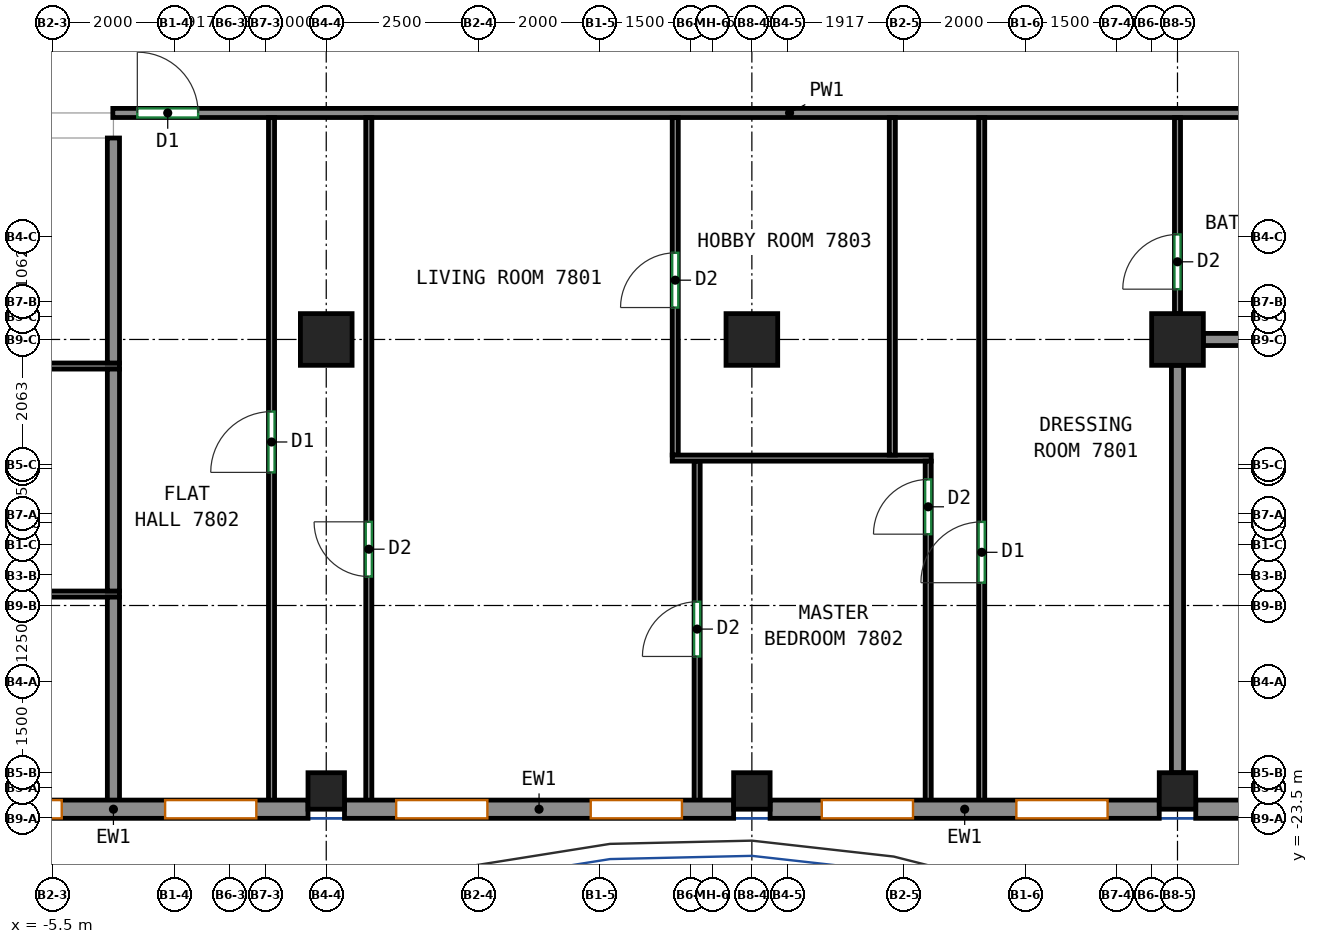
"""IFC4 building model, lengths in metres.
Left out: names, types, materials, properties, quantities, classifications, styles, units other than length and angle.
Written with IfcOpenShell. Run it as: python <this file> out.ifc"""

import sys

from ifc_helpers import new_model, si_unit, direction, frame, frame_2d, origin, origin_2d, place, context, subcontext, project, spatial, rectangle, extrude, source, transform, mapped, element, fill, save


model = new_model("IFC4")
c1 = context("Model", 3, precision=1e-05, world=origin(), true_north=direction((0.0, 1.0)))
c2 = subcontext(c1, "Body", "Model", "MODEL_VIEW")
j1 = project(units=[si_unit("LENGTHUNIT", "METRE"), si_unit("PLANEANGLEUNIT", "RADIAN")], contexts=[c1])
p1 = place(None, origin())
s1 = spatial("IfcSite", under=j1, at=p1, CompositionType="ELEMENT")
p2 = place(p1, origin())
s2 = spatial("IfcBuilding", under=s1, at=p2, CompositionType="ELEMENT")
p3 = place(p2, frame((0.0, 0.0, 312.0)))
s3 = spatial("IfcBuildingStorey", under=s2, at=p3, CompositionType="ELEMENT", Elevation=312.0)
m1 = source(origin(), c2, "Body", "SweptSolid", [
    extrude(rectangle(XDim=0.6, YDim=0.6, at=origin_2d()), origin(), (0.0, 0.0, 1.0), 3.12),
])
p4 = place(p3, frame((-1.0, -23.05, 0.0), z_axis=(0.0, 0.0, 1.0), x_axis=(1.0, 0.0, 0.0)))
e1 = element("IfcColumn", 1, at=p4, inside=s3, PredefinedType="COLUMN", context=c2, shape_type="MappedRepresentation", body=[
    mapped(m1, transform((0.0, 0.0, 0.0))),
])
m2 = source(origin(), c2, "Body", "SweptSolid", [
    extrude(rectangle(XDim=0.85, YDim=0.85, at=origin_2d()), origin(), (0.0, 0.0, 1.0), 3.12),
])
p5 = place(p3, frame((-1.0, -15.625, 0.0), z_axis=(0.0, 0.0, 1.0), x_axis=(1.0, 0.0, 0.0)))
e2 = element("IfcColumn", 2, at=p5, inside=s3, PredefinedType="COLUMN", context=c2, shape_type="MappedRepresentation", body=[
    mapped(m2, transform((0.0, 0.0, 0.0))),
])
p6 = place(p3, frame((6.0, -23.05, 0.0), z_axis=(0.0, 0.0, 1.0), x_axis=(1.0, 0.0, 0.0)))
e3 = element("IfcColumn", 3, at=p6, inside=s3, PredefinedType="COLUMN", context=c2, shape_type="MappedRepresentation", body=[
    mapped(m1, transform((0.0, 0.0, 0.0))),
])
p7 = place(p3, frame((6.0, -15.625, 0.0), z_axis=(0.0, 0.0, 1.0), x_axis=(1.0, 0.0, 0.0)))
e4 = element("IfcColumn", 4, at=p7, inside=s3, PredefinedType="COLUMN", context=c2, shape_type="MappedRepresentation", body=[
    mapped(m2, transform((0.0, 0.0, 0.0))),
])
p8 = place(p3, frame((13.0, -23.05, 0.0), z_axis=(0.0, 0.0, 1.0), x_axis=(1.0, 0.0, 0.0)))
e5 = element("IfcColumn", 5, at=p8, inside=s3, PredefinedType="COLUMN", context=c2, shape_type="MappedRepresentation", body=[
    mapped(m1, transform((0.0, 0.0, 0.0))),
])
p9 = place(p3, frame((13.0, -15.625, 0.0), z_axis=(0.0, 0.0, 1.0), x_axis=(1.0, 0.0, 0.0)))
e6 = element("IfcColumn", 6, at=p9, inside=s3, PredefinedType="COLUMN", context=c2, shape_type="MappedRepresentation", body=[
    mapped(m2, transform((0.0, 0.0, 0.0))),
])
m3 = source(origin(), c2, "Body", "SweptSolid", [
    extrude(rectangle(XDim=6.4, YDim=0.3, at=frame_2d((3.2, 0.0))), origin(), (0.0, 0.0, 1.0), 3.12),
])
p10 = place(p3, frame((-7.7, -23.35, 0.0), z_axis=(0.0, 0.0, 1.0), x_axis=(1.0, 0.0, 0.0)))
e7 = element("IfcWall", 7, at=p10, inside=s3, PredefinedType="SOLIDWALL", context=c2, shape_type="MappedRepresentation", body=[
    mapped(m3, transform((0.0, 0.0, 0.0))),
])
p11 = place(p10, frame((0.85, 0.0, 0.8)))
e8 = element("IfcOpeningElement", 8, at=p11, cuts=e7, PredefinedType="OPENING", context=c2, shape_type="SweptSolid", body=[
    extrude(rectangle(XDim=1.5, YDim=2.05, at=frame_2d((0.75, 1.025))), frame((0.0, 0.16, 0.0), z_axis=(0.0, -1.0, 0.0), x_axis=(1.0, 0.0, 0.0)), (0.0, 0.0, 1.0), 0.32),
])
p12 = place(p10, frame((4.05, 0.0, 0.8)))
e9 = element("IfcOpeningElement", 9, at=p12, cuts=e7, PredefinedType="OPENING", context=c2, shape_type="SweptSolid", body=[
    extrude(rectangle(XDim=1.5, YDim=2.05, at=frame_2d((0.75, 1.025))), frame((0.0, 0.16, 0.0), z_axis=(0.0, -1.0, 0.0), x_axis=(1.0, 0.0, 0.0)), (0.0, 0.0, 1.0), 0.32),
])
p13 = place(p3, frame((-0.7, -23.35, 0.0), z_axis=(0.0, 0.0, 1.0), x_axis=(1.0, 0.0, 0.0)))
e10 = element("IfcWall", 10, at=p13, inside=s3, PredefinedType="SOLIDWALL", context=c2, shape_type="MappedRepresentation", body=[
    mapped(m3, transform((0.0, 0.0, 0.0))),
])
p14 = place(p13, frame((0.85, 0.0, 0.8)))
e11 = element("IfcOpeningElement", 11, at=p14, cuts=e10, PredefinedType="OPENING", context=c2, shape_type="SweptSolid", body=[
    extrude(rectangle(XDim=1.5, YDim=2.05, at=frame_2d((0.75, 1.025))), frame((0.0, 0.16, 0.0), z_axis=(0.0, -1.0, 0.0), x_axis=(1.0, 0.0, 0.0)), (0.0, 0.0, 1.0), 0.32),
])
p15 = place(p13, frame((4.05, 0.0, 0.8)))
e12 = element("IfcOpeningElement", 12, at=p15, cuts=e10, PredefinedType="OPENING", context=c2, shape_type="SweptSolid", body=[
    extrude(rectangle(XDim=1.5, YDim=2.05, at=frame_2d((0.75, 1.025))), frame((0.0, 0.16, 0.0), z_axis=(0.0, -1.0, 0.0), x_axis=(1.0, 0.0, 0.0)), (0.0, 0.0, 1.0), 0.32),
])
p16 = place(p3, frame((6.3, -23.35, 0.0), z_axis=(0.0, 0.0, 1.0), x_axis=(1.0, 0.0, 0.0)))
e13 = element("IfcWall", 13, at=p16, inside=s3, PredefinedType="SOLIDWALL", context=c2, shape_type="MappedRepresentation", body=[
    mapped(m3, transform((0.0, 0.0, 0.0))),
])
p17 = place(p16, frame((0.85, 0.0, 0.8)))
e14 = element("IfcOpeningElement", 14, at=p17, cuts=e13, PredefinedType="OPENING", context=c2, shape_type="SweptSolid", body=[
    extrude(rectangle(XDim=1.5, YDim=2.05, at=frame_2d((0.75, 1.025))), frame((0.0, 0.16, 0.0), z_axis=(0.0, -1.0, 0.0), x_axis=(1.0, 0.0, 0.0)), (0.0, 0.0, 1.0), 0.32),
])
p18 = place(p16, frame((4.05, 0.0, 0.8)))
e15 = element("IfcOpeningElement", 15, at=p18, cuts=e13, PredefinedType="OPENING", context=c2, shape_type="SweptSolid", body=[
    extrude(rectangle(XDim=1.5, YDim=2.05, at=frame_2d((0.75, 1.025))), frame((0.0, 0.16, 0.0), z_axis=(0.0, -1.0, 0.0), x_axis=(1.0, 0.0, 0.0)), (0.0, 0.0, 1.0), 0.32),
])
p19 = place(p3, frame((13.3, -23.35, 0.0), z_axis=(0.0, 0.0, 1.0), x_axis=(1.0, 0.0, 0.0)))
e16 = element("IfcWall", 16, at=p19, inside=s3, PredefinedType="SOLIDWALL", context=c2, shape_type="MappedRepresentation", body=[
    mapped(m3, transform((0.0, 0.0, 0.0))),
])
p20 = place(p19, frame((0.85, 0.0, 0.8)))
e17 = element("IfcOpeningElement", 17, at=p20, cuts=e16, PredefinedType="OPENING", context=c2, shape_type="SweptSolid", body=[
    extrude(rectangle(XDim=1.5, YDim=2.05, at=frame_2d((0.75, 1.025))), frame((0.0, 0.16, 0.0), z_axis=(0.0, -1.0, 0.0), x_axis=(1.0, 0.0, 0.0)), (0.0, 0.0, 1.0), 0.32),
])
p21 = place(p19, frame((4.05, 0.0, 0.8)))
e18 = element("IfcOpeningElement", 18, at=p21, cuts=e16, PredefinedType="OPENING", context=c2, shape_type="SweptSolid", body=[
    extrude(rectangle(XDim=1.5, YDim=2.05, at=frame_2d((0.75, 1.025))), frame((0.0, 0.16, 0.0), z_axis=(0.0, -1.0, 0.0), x_axis=(1.0, 0.0, 0.0)), (0.0, 0.0, 1.0), 0.32),
])
p22 = place(p3, frame((-4.51, -11.9, 0.0), z_axis=(0.0, 0.0, 1.0), x_axis=(1.0, 0.0, 0.0)))
e19 = element("IfcWall", 19, at=p22, inside=s3, PredefinedType="PARTITIONING", context=c2, shape_type="SweptSolid", body=[
    extrude(rectangle(XDim=22.26, YDim=0.15, at=frame_2d((11.13, 0.0))), origin(), (0.0, 0.0, 1.0), 3.12),
])
p23 = place(p22, frame((0.403, 0.0, 0.0)))
e20 = element("IfcOpeningElement", 20, at=p23, cuts=e19, PredefinedType="OPENING", context=c2, shape_type="SweptSolid", body=[
    extrude(rectangle(XDim=1.0, YDim=2.1, at=frame_2d((0.5, 1.05))), frame((0.0, 0.085, 0.0), z_axis=(0.0, -1.0, 0.0), x_axis=(1.0, 0.0, 0.0)), (0.0, 0.0, 1.0), 0.17),
])
p24 = place(p3, frame((-24.75, -19.812, 0.0), z_axis=(0.0, 0.0, 1.0), x_axis=(1.0, 0.0, 0.0)))
e21 = element("IfcWall", 21, at=p24, inside=s3, PredefinedType="PARTITIONING", context=c2, shape_type="SweptSolid", body=[
    extrude(rectangle(XDim=20.35, YDim=0.1, at=frame_2d((10.175, 0.0))), origin(), (0.0, 0.0, 1.0), 3.12),
])
p25 = place(p24, frame((2.624, 0.0, 0.0)))
e22 = element("IfcOpeningElement", 22, at=p25, cuts=e21, PredefinedType="OPENING", context=c2, shape_type="SweptSolid", body=[
    extrude(rectangle(XDim=0.9, YDim=2.1, at=frame_2d((0.45, 1.05))), frame((0.0, 0.06, 0.0), z_axis=(0.0, -1.0, 0.0), x_axis=(1.0, 0.0, 0.0)), (0.0, 0.0, 1.0), 0.12),
])
p26 = place(p3, frame((-4.5, -23.25, 0.0), z_axis=(0.0, 0.0, 1.0), x_axis=(0.0, 1.0, 0.0)))
e23 = element("IfcWall", 23, at=p26, inside=s3, PredefinedType="PARTITIONING", context=c2, shape_type="SweptSolid", body=[
    extrude(rectangle(XDim=3.388, YDim=0.2, at=frame_2d((1.694, 0.0))), origin(), (0.0, 0.0, 1.0), 3.12),
])
p27 = place(p3, frame((-7.575, -16.062, 0.0), z_axis=(0.0, 0.0, 1.0), x_axis=(1.0, 0.0, 0.0)))
e24 = element("IfcWall", 24, at=p27, inside=s3, PredefinedType="PARTITIONING", context=c2, shape_type="SweptSolid", body=[
    extrude(rectangle(XDim=3.175, YDim=0.1, at=frame_2d((1.587, 0.0))), origin(), (0.0, 0.0, 1.0), 3.12),
])
p28 = place(p3, frame((-4.5, -19.762, 0.0), z_axis=(0.0, 0.0, 1.0), x_axis=(0.0, 1.0, 0.0)))
e25 = element("IfcWall", 25, at=p28, inside=s3, PredefinedType="PARTITIONING", context=c2, shape_type="SweptSolid", body=[
    extrude(rectangle(XDim=3.65, YDim=0.2, at=frame_2d((1.825, 0.0))), origin(), (0.0, 0.0, 1.0), 3.12),
])
p29 = place(p3, frame((-4.5, -16.012, 0.0), z_axis=(0.0, 0.0, 1.0), x_axis=(0.0, 1.0, 0.0)))
e26 = element("IfcWall", 26, at=p29, inside=s3, PredefinedType="PARTITIONING", context=c2, shape_type="SweptSolid", body=[
    extrude(rectangle(XDim=3.7, YDim=0.2, at=frame_2d((1.85, 0.0))), origin(), (0.0, 0.0, 1.0), 3.12),
])
p30 = place(p3, frame((-1.9, -23.25, 0.0), z_axis=(0.0, 0.0, 1.0), x_axis=(0.0, 1.0, 0.0)))
e27 = element("IfcWall", 27, at=p30, inside=s3, PredefinedType="PARTITIONING", context=c2, shape_type="SweptSolid", body=[
    extrude(rectangle(XDim=11.273, YDim=0.1, at=frame_2d((5.636, 0.0))), origin(), (0.0, 0.0, 1.0), 3.12),
])
p31 = place(p30, frame((5.439, 0.0, 0.0)))
e28 = element("IfcOpeningElement", 28, at=p31, cuts=e27, PredefinedType="OPENING", context=c2, shape_type="SweptSolid", body=[
    extrude(rectangle(XDim=1.0, YDim=2.1, at=frame_2d((0.5, 1.05))), frame((0.0, 0.06, 0.0), z_axis=(0.0, -1.0, 0.0), x_axis=(1.0, 0.0, 0.0)), (0.0, 0.0, 1.0), 0.12),
])
p32 = place(p3, frame((-0.3, -23.25, 0.0), z_axis=(0.0, 0.0, 1.0), x_axis=(0.0, 1.0, 0.0)))
e29 = element("IfcWall", 29, at=p32, inside=s3, PredefinedType="PARTITIONING", context=c2, shape_type="SweptSolid", body=[
    extrude(rectangle(XDim=11.273, YDim=0.1, at=frame_2d((5.636, 0.0))), origin(), (0.0, 0.0, 1.0), 3.12),
])
p33 = place(p32, frame((3.726, 0.0, 0.0)))
e30 = element("IfcOpeningElement", 30, at=p33, cuts=e29, PredefinedType="OPENING", context=c2, shape_type="SweptSolid", body=[
    extrude(rectangle(XDim=0.9, YDim=2.1, at=frame_2d((0.45, 1.05))), frame((0.0, 0.06, 0.0), z_axis=(0.0, -1.0, 0.0), x_axis=(1.0, 0.0, 0.0)), (0.0, 0.0, 1.0), 0.12),
])
p34 = place(p3, frame((5.1, -23.25, 0.0), z_axis=(0.0, 0.0, 1.0), x_axis=(0.0, 1.0, 0.0)))
e31 = element("IfcWall", 31, at=p34, inside=s3, PredefinedType="PARTITIONING", context=c2, shape_type="SweptSolid", body=[
    extrude(rectangle(XDim=5.624, YDim=0.1, at=frame_2d((2.812, 0.0))), origin(), (0.0, 0.0, 1.0), 3.12),
])
p35 = place(p34, frame((2.412, 0.0, 0.0)))
e32 = element("IfcOpeningElement", 32, at=p35, cuts=e31, PredefinedType="OPENING", context=c2, shape_type="SweptSolid", body=[
    extrude(rectangle(XDim=0.9, YDim=2.1, at=frame_2d((0.45, 1.05))), frame((0.0, 0.06, 0.0), z_axis=(0.0, -1.0, 0.0), x_axis=(1.0, 0.0, 0.0)), (0.0, 0.0, 1.0), 0.12),
])
p36 = place(p3, frame((4.74, -17.526, 0.0), z_axis=(0.0, 0.0, 1.0), x_axis=(0.0, 1.0, 0.0)))
e33 = element("IfcWall", 33, at=p36, inside=s3, PredefinedType="PARTITIONING", context=c2, shape_type="SweptSolid", body=[
    extrude(rectangle(XDim=5.549, YDim=0.1, at=frame_2d((2.774, 0.0))), origin(), (0.0, 0.0, 1.0), 3.12),
])
p37 = place(p36, frame((2.426, 0.0, 0.0)))
e34 = element("IfcOpeningElement", 34, at=p37, cuts=e33, PredefinedType="OPENING", context=c2, shape_type="SweptSolid", body=[
    extrude(rectangle(XDim=0.9, YDim=2.1, at=frame_2d((0.45, 1.05))), frame((0.0, 0.06, 0.0), z_axis=(0.0, -1.0, 0.0), x_axis=(1.0, 0.0, 0.0)), (0.0, 0.0, 1.0), 0.12),
])
p38 = place(p3, frame((4.69, -17.576, 0.0), z_axis=(0.0, 0.0, 1.0), x_axis=(1.0, 0.0, 0.0)))
e35 = element("IfcWall", 35, at=p38, inside=s3, PredefinedType="PARTITIONING", context=c2, shape_type="SweptSolid", body=[
    extrude(rectangle(XDim=4.26, YDim=0.1, at=frame_2d((2.13, 0.0))), origin(), (0.0, 0.0, 1.0), 3.12),
])
p39 = place(p3, frame((8.9, -23.25, 0.0), z_axis=(0.0, 0.0, 1.0), x_axis=(0.0, 1.0, 0.0)))
e36 = element("IfcWall", 36, at=p39, inside=s3, PredefinedType="PARTITIONING", context=c2, shape_type="SweptSolid", body=[
    extrude(rectangle(XDim=5.624, YDim=0.1, at=frame_2d((2.812, 0.0))), origin(), (0.0, 0.0, 1.0), 3.12),
])
p40 = place(p39, frame((4.423, 0.0, 0.0)))
e37 = element("IfcOpeningElement", 37, at=p40, cuts=e36, PredefinedType="OPENING", context=c2, shape_type="SweptSolid", body=[
    extrude(rectangle(XDim=0.9, YDim=2.1, at=frame_2d((0.45, 1.05))), frame((0.0, 0.06, 0.0), z_axis=(0.0, -1.0, 0.0), x_axis=(1.0, 0.0, 0.0)), (0.0, 0.0, 1.0), 0.12),
])
p41 = place(p3, frame((8.31, -17.526, 0.0), z_axis=(0.0, 0.0, 1.0), x_axis=(0.0, 1.0, 0.0)))
e38 = element("IfcWall", 38, at=p41, inside=s3, PredefinedType="PARTITIONING", context=c2, shape_type="SweptSolid", body=[
    extrude(rectangle(XDim=5.549, YDim=0.1, at=frame_2d((2.774, 0.0))), origin(), (0.0, 0.0, 1.0), 3.12),
])
p42 = place(p3, frame((9.78, -23.25, 0.0), z_axis=(0.0, 0.0, 1.0), x_axis=(0.0, 1.0, 0.0)))
e39 = element("IfcWall", 39, at=p42, inside=s3, PredefinedType="PARTITIONING", context=c2, shape_type="SweptSolid", body=[
    extrude(rectangle(XDim=11.273, YDim=0.1, at=frame_2d((5.636, 0.0))), origin(), (0.0, 0.0, 1.0), 3.12),
])
p43 = place(p42, frame((3.625, 0.0, 0.0)))
e40 = element("IfcOpeningElement", 40, at=p43, cuts=e39, PredefinedType="OPENING", context=c2, shape_type="SweptSolid", body=[
    extrude(rectangle(XDim=1.0, YDim=2.1, at=frame_2d((0.5, 1.05))), frame((0.0, 0.06, 0.0), z_axis=(0.0, -1.0, 0.0), x_axis=(1.0, 0.0, 0.0)), (0.0, 0.0, 1.0), 0.12),
])
p44 = place(p3, frame((13.0, -15.2, 0.0), z_axis=(0.0, 0.0, 1.0), x_axis=(0.0, 1.0, 0.0)))
e41 = element("IfcWall", 41, at=p44, inside=s3, PredefinedType="PARTITIONING", context=c2, shape_type="SweptSolid", body=[
    extrude(rectangle(XDim=3.223, YDim=0.1, at=frame_2d((1.611, 0.0))), origin(), (0.0, 0.0, 1.0), 3.12),
])
p45 = place(p44, frame((0.402, 0.0, 0.0)))
e42 = element("IfcOpeningElement", 42, at=p45, cuts=e41, PredefinedType="OPENING", context=c2, shape_type="SweptSolid", body=[
    extrude(rectangle(XDim=0.9, YDim=2.1, at=frame_2d((0.45, 1.05))), frame((0.0, 0.06, 0.0), z_axis=(0.0, -1.0, 0.0), x_axis=(1.0, 0.0, 0.0)), (0.0, 0.0, 1.0), 0.12),
])
p46 = place(p3, frame((13.0, -22.75, 0.0), z_axis=(0.0, 0.0, 1.0), x_axis=(0.0, 1.0, 0.0)))
e43 = element("IfcWall", 43, at=p46, inside=s3, PredefinedType="PARTITIONING", context=c2, shape_type="SweptSolid", body=[
    extrude(rectangle(XDim=6.7, YDim=0.2, at=frame_2d((3.35, 0.0))), origin(), (0.0, 0.0, 1.0), 3.12),
])
p47 = place(p3, frame((13.425, -15.625, 0.0), z_axis=(0.0, 0.0, 1.0), x_axis=(1.0, 0.0, 0.0)))
e44 = element("IfcWall", 44, at=p47, inside=s3, PredefinedType="PARTITIONING", context=c2, shape_type="SweptSolid", body=[
    extrude(rectangle(XDim=3.175, YDim=0.2, at=frame_2d((1.587, 0.0))), origin(), (0.0, 0.0, 1.0), 3.12),
])
p48 = place(p11, origin())
e45 = element("IfcWindow", 45, at=p48, inside=s3, PartitioningType="SINGLE_PANEL", PredefinedType="WINDOW", context=c2, shape_type="SweptSolid", body=[
    extrude(rectangle(XDim=1.5, YDim=2.05, at=frame_2d((0.75, 1.025))), frame((0.0, 0.03, 0.0), z_axis=(0.0, -1.0, 0.0), x_axis=(1.0, 0.0, 0.0)), (0.0, 0.0, 1.0), 0.06),
])
fill(e8, e45)
p49 = place(p12, origin())
e46 = element("IfcWindow", 46, at=p49, inside=s3, PartitioningType="SINGLE_PANEL", PredefinedType="WINDOW", context=c2, shape_type="SweptSolid", body=[
    extrude(rectangle(XDim=1.5, YDim=2.05, at=frame_2d((0.75, 1.025))), frame((0.0, 0.03, 0.0), z_axis=(0.0, -1.0, 0.0), x_axis=(1.0, 0.0, 0.0)), (0.0, 0.0, 1.0), 0.06),
])
fill(e9, e46)
p50 = place(p14, origin())
e47 = element("IfcWindow", 47, at=p50, inside=s3, PartitioningType="SINGLE_PANEL", PredefinedType="WINDOW", context=c2, shape_type="SweptSolid", body=[
    extrude(rectangle(XDim=1.5, YDim=2.05, at=frame_2d((0.75, 1.025))), frame((0.0, 0.03, 0.0), z_axis=(0.0, -1.0, 0.0), x_axis=(1.0, 0.0, 0.0)), (0.0, 0.0, 1.0), 0.06),
])
fill(e11, e47)
p51 = place(p15, origin())
e48 = element("IfcWindow", 48, at=p51, inside=s3, PartitioningType="SINGLE_PANEL", PredefinedType="WINDOW", context=c2, shape_type="SweptSolid", body=[
    extrude(rectangle(XDim=1.5, YDim=2.05, at=frame_2d((0.75, 1.025))), frame((0.0, 0.03, 0.0), z_axis=(0.0, -1.0, 0.0), x_axis=(1.0, 0.0, 0.0)), (0.0, 0.0, 1.0), 0.06),
])
fill(e12, e48)
p52 = place(p17, origin())
e49 = element("IfcWindow", 49, at=p52, inside=s3, PartitioningType="SINGLE_PANEL", PredefinedType="WINDOW", context=c2, shape_type="SweptSolid", body=[
    extrude(rectangle(XDim=1.5, YDim=2.05, at=frame_2d((0.75, 1.025))), frame((0.0, 0.03, 0.0), z_axis=(0.0, -1.0, 0.0), x_axis=(1.0, 0.0, 0.0)), (0.0, 0.0, 1.0), 0.06),
])
fill(e14, e49)
p53 = place(p18, origin())
e50 = element("IfcWindow", 50, at=p53, inside=s3, PartitioningType="SINGLE_PANEL", PredefinedType="WINDOW", context=c2, shape_type="SweptSolid", body=[
    extrude(rectangle(XDim=1.5, YDim=2.05, at=frame_2d((0.75, 1.025))), frame((0.0, 0.03, 0.0), z_axis=(0.0, -1.0, 0.0), x_axis=(1.0, 0.0, 0.0)), (0.0, 0.0, 1.0), 0.06),
])
fill(e15, e50)
p54 = place(p35, origin())
e51 = element("IfcDoor", 51, at=p54, inside=s3, OperationType="SINGLE_SWING_LEFT", PredefinedType="DOOR", context=c2, shape_type="SweptSolid", body=[
    extrude(rectangle(XDim=0.9, YDim=2.1, at=frame_2d((0.45, 1.05))), frame((0.0, 0.025, 0.0), z_axis=(0.0, -1.0, 0.0), x_axis=(1.0, 0.0, 0.0)), (0.0, 0.0, 1.0), 0.05),
])
fill(e32, e51)
p55 = place(p43, origin())
e52 = element("IfcDoor", 52, at=p55, inside=s3, OperationType="SINGLE_SWING_LEFT", PredefinedType="DOOR", context=c2, shape_type="SweptSolid", body=[
    extrude(rectangle(XDim=1.0, YDim=2.1, at=frame_2d((0.5, 1.05))), frame((0.0, 0.025, 0.0), z_axis=(0.0, -1.0, 0.0), x_axis=(1.0, 0.0, 0.0)), (0.0, 0.0, 1.0), 0.05),
])
fill(e40, e52)
p56 = place(p33, origin())
e53 = element("IfcDoor", 53, at=p56, inside=s3, OperationType="SINGLE_SWING_RIGHT", PredefinedType="DOOR", context=c2, shape_type="SweptSolid", body=[
    extrude(rectangle(XDim=0.9, YDim=2.1, at=frame_2d((0.45, 1.05))), frame((0.0, 0.025, 0.0), z_axis=(0.0, -1.0, 0.0), x_axis=(1.0, 0.0, 0.0)), (0.0, 0.0, 1.0), 0.05),
])
fill(e30, e53)
p57 = place(p40, origin())
e54 = element("IfcDoor", 54, at=p57, inside=s3, OperationType="SINGLE_SWING_LEFT", PredefinedType="DOOR", context=c2, shape_type="SweptSolid", body=[
    extrude(rectangle(XDim=0.9, YDim=2.1, at=frame_2d((0.45, 1.05))), frame((0.0, 0.025, 0.0), z_axis=(0.0, -1.0, 0.0), x_axis=(1.0, 0.0, 0.0)), (0.0, 0.0, 1.0), 0.05),
])
fill(e37, e54)
p58 = place(p31, origin())
e55 = element("IfcDoor", 55, at=p58, inside=s3, OperationType="SINGLE_SWING_LEFT", PredefinedType="DOOR", context=c2, shape_type="SweptSolid", body=[
    extrude(rectangle(XDim=1.0, YDim=2.1, at=frame_2d((0.5, 1.05))), frame((0.0, 0.025, 0.0), z_axis=(0.0, -1.0, 0.0), x_axis=(1.0, 0.0, 0.0)), (0.0, 0.0, 1.0), 0.05),
])
fill(e28, e55)
p59 = place(p37, origin())
e56 = element("IfcDoor", 56, at=p59, inside=s3, OperationType="SINGLE_SWING_LEFT", PredefinedType="DOOR", context=c2, shape_type="SweptSolid", body=[
    extrude(rectangle(XDim=0.9, YDim=2.1, at=frame_2d((0.45, 1.05))), frame((0.0, 0.025, 0.0), z_axis=(0.0, -1.0, 0.0), x_axis=(1.0, 0.0, 0.0)), (0.0, 0.0, 1.0), 0.05),
])
fill(e34, e56)
p60 = place(p45, origin())
e57 = element("IfcDoor", 57, at=p60, inside=s3, OperationType="SINGLE_SWING_LEFT", PredefinedType="DOOR", context=c2, shape_type="SweptSolid", body=[
    extrude(rectangle(XDim=0.9, YDim=2.1, at=frame_2d((0.45, 1.05))), frame((0.0, 0.025, 0.0), z_axis=(0.0, -1.0, 0.0), x_axis=(1.0, 0.0, 0.0)), (0.0, 0.0, 1.0), 0.05),
])
fill(e42, e57)
p61 = place(p23, origin())
e58 = element("IfcDoor", 58, at=p61, inside=s3, OperationType="SINGLE_SWING_LEFT", PredefinedType="DOOR", context=c2, shape_type="SweptSolid", body=[
    extrude(rectangle(XDim=1.0, YDim=2.1, at=frame_2d((0.5, 1.05))), frame((0.0, 0.025, 0.0), z_axis=(0.0, -1.0, 0.0), x_axis=(1.0, 0.0, 0.0)), (0.0, 0.0, 1.0), 0.05),
])
fill(e20, e58)
save(model, sys.argv[1])
